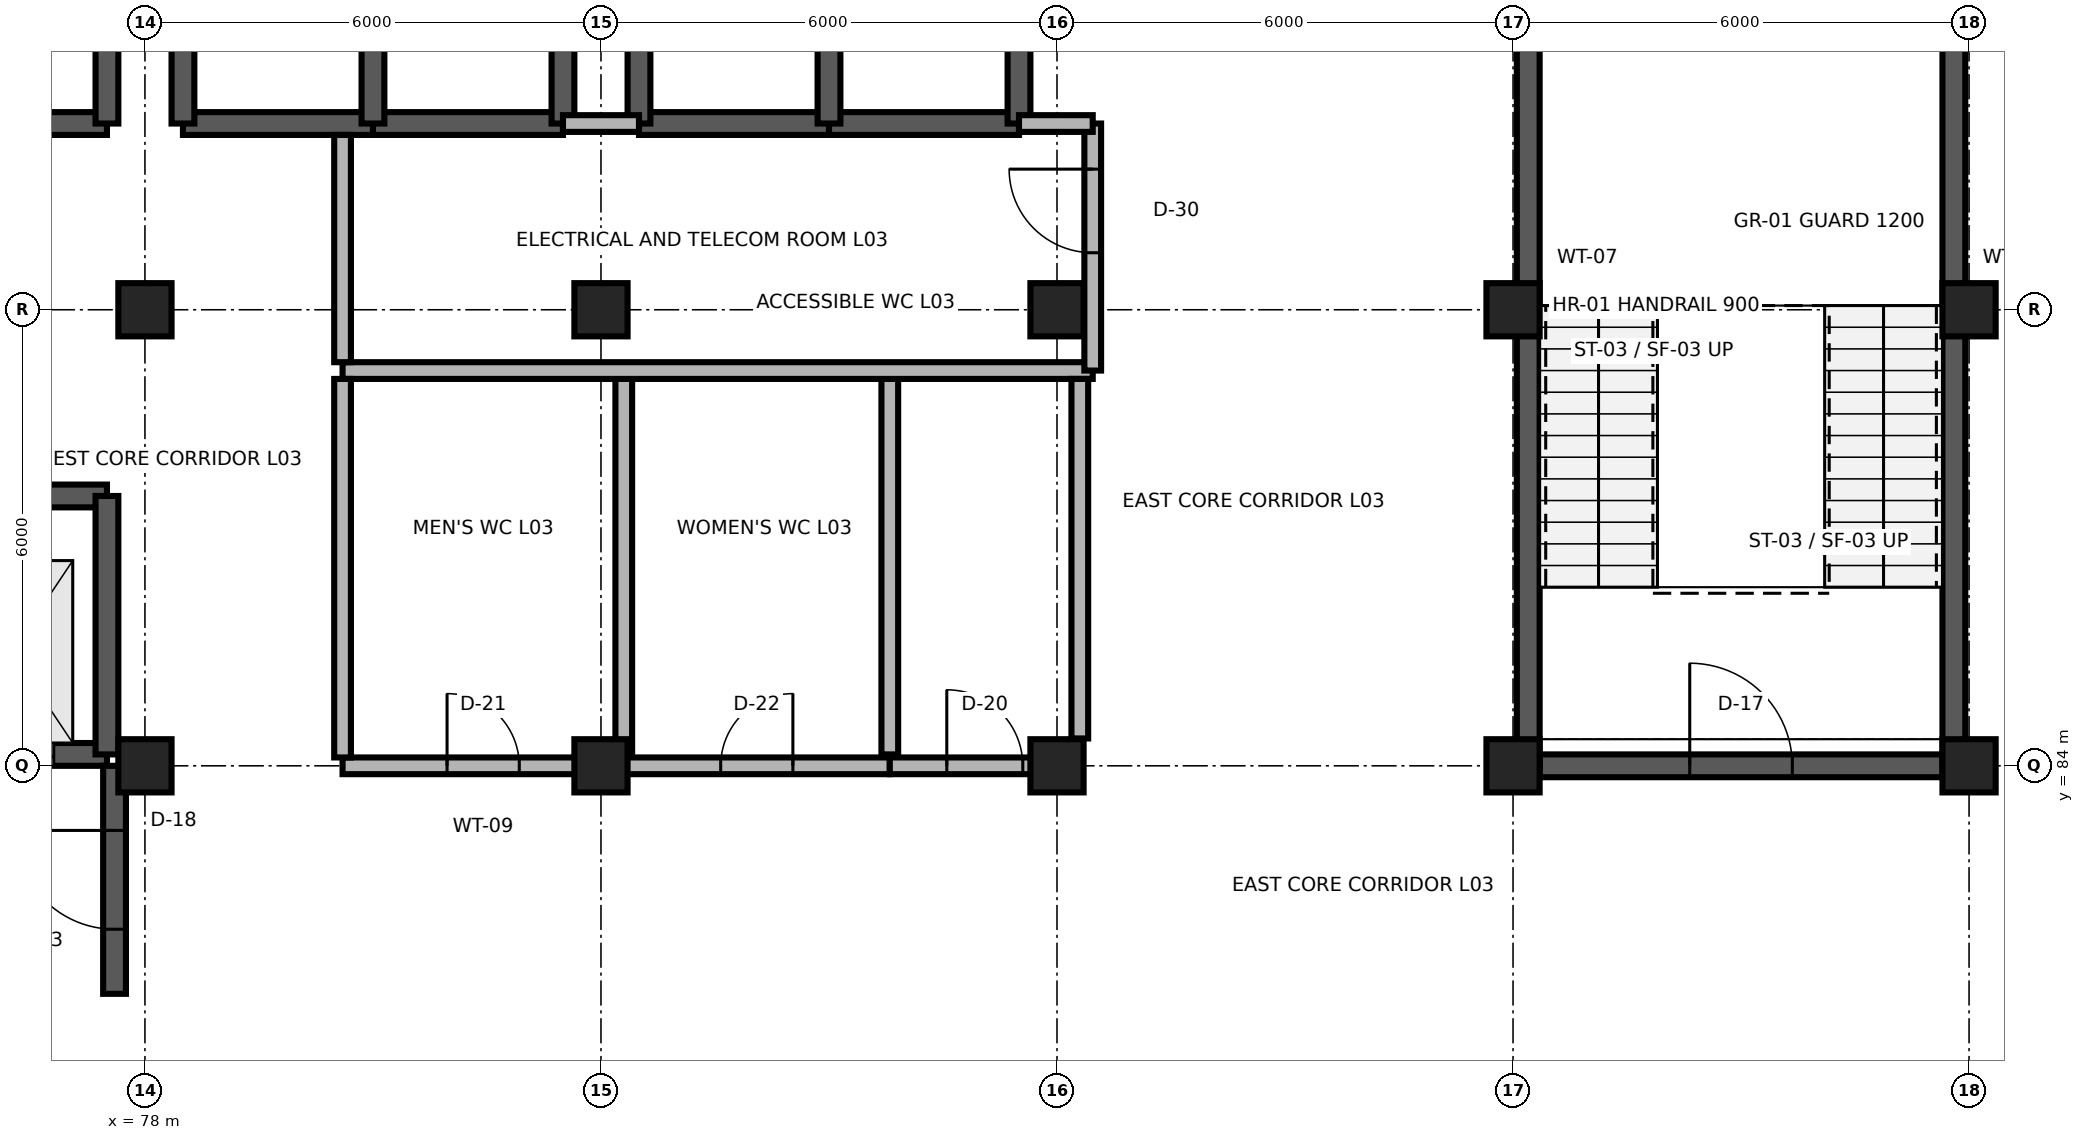
"""IFC4 building model, lengths in metres.
Left out: names, types, materials, properties, quantities, classifications, styles, units other than length and angle.
Written with IfcOpenShell. Run it as: python <this file> out.ifc"""

import sys

from ifc_helpers import new_model, si_unit, direction, frame, frame_2d, origin, origin_2d, place, context, subcontext, project, spatial, rectangle, extrude, element, fill, save


model = new_model("IFC4")
c1 = context("Model", 3, precision=1e-05, world=origin(), true_north=direction((0.0, 1.0)))
c2 = subcontext(c1, "Body", "Model", "MODEL_VIEW")
j1 = project(units=[si_unit("LENGTHUNIT", "METRE"), si_unit("PLANEANGLEUNIT", "RADIAN")], contexts=[c1])
p1 = place(None, origin())
s1 = spatial("IfcSite", under=j1, at=p1, CompositionType="ELEMENT")
p2 = place(p1, origin())
s2 = spatial("IfcBuilding", under=s1, at=p2, CompositionType="ELEMENT")
p3 = place(p2, frame((0.0, 0.0, 12.0)))
s3 = spatial("IfcBuildingStorey", under=s2, at=p3, CompositionType="ELEMENT", Elevation=12.0)
for number, where, z_axis, x_axis in (
    (1, (78.0, 84.0, 0.0), (0.0, 0.0, 1.0), (1.0, 0.0, 0.0)),
    (2, (84.0, 84.0, 0.0), (0.0, 0.0, 1.0), (1.0, 0.0, 0.0)),
    (3, (90.0, 84.0, 0.0), (0.0, 0.0, 1.0), (1.0, 0.0, 0.0)),
    (4, (96.0, 84.0, 0.0), (0.0, 0.0, 1.0), (1.0, 0.0, 0.0)),
    (5, (102.0, 84.0, 0.0), (0.0, 0.0, 1.0), (1.0, 0.0, 0.0)),
    (6, (78.0, 90.0, 0.0), (0.0, 0.0, 1.0), (1.0, 0.0, 0.0)),
    (7, (84.0, 90.0, 0.0), (0.0, 0.0, 1.0), (1.0, 0.0, 0.0)),
    (8, (90.0, 90.0, 0.0), (0.0, 0.0, 1.0), (1.0, 0.0, 0.0)),
    (9, (96.0, 90.0, 0.0), (0.0, 0.0, 1.0), (1.0, 0.0, 0.0)),
    (10, (102.0, 90.0, 0.0), (0.0, 0.0, 1.0), (1.0, 0.0, 0.0)),
):
    element("IfcColumn", number, at=place(p3, frame(where, z_axis=z_axis, x_axis=x_axis)), inside=s3, PredefinedType="COLUMN", context=c2, shape_type="SweptSolid", body=[
        extrude(rectangle(XDim=0.7, YDim=0.7, at=origin_2d()), origin(), (0.0, 0.0, 1.0), 4.5),
    ])
p4 = place(p3, frame((96.35, 84.0, 0.0), z_axis=(0.0, 0.0, 1.0), x_axis=(1.0, 0.0, 0.0)))
e11 = element("IfcWall", 11, at=p4, inside=s3, PredefinedType="SHEAR", context=c2, shape_type="SweptSolid", body=[
    extrude(rectangle(XDim=5.3, YDim=0.3, at=frame_2d((2.65, 0.0))), origin(), (0.0, 0.0, 1.0), 4.22),
])
p5 = place(p4, frame((1.975, 0.0, 0.0)))
e12 = element("IfcOpeningElement", 12, at=p5, cuts=e11, PredefinedType="OPENING", context=c2, shape_type="SweptSolid", body=[
    extrude(rectangle(XDim=1.35, YDim=2.2, at=frame_2d((0.675, 1.1))), frame((0.0, 0.165, 0.0), z_axis=(0.0, -1.0, 0.0), x_axis=(1.0, 0.0, 0.0)), (0.0, 0.0, 1.0), 0.33),
])
for number, where, z_axis, x_axis in (
    (13, (96.2, 84.0, 0.0), (0.0, 0.0, 1.0), (0.0, 1.0, 0.0)),
    (14, (101.8, 84.0, 0.0), (0.0, 0.0, 1.0), (0.0, 1.0, 0.0)),
):
    element("IfcWall", number, at=place(p3, frame(where, z_axis=z_axis, x_axis=x_axis)), inside=s3, PredefinedType="SHEAR", context=c2, shape_type="SweptSolid", body=[
        extrude(rectangle(XDim=11.8, YDim=0.3, at=frame_2d((5.9, 0.0))), origin(), (0.0, 0.0, 1.0), 4.22),
    ])
p6 = place(p3, frame((75.0, 84.15, 0.0), z_axis=(0.0, 0.0, 1.0), x_axis=(1.0, 0.0, 0.0)))
e15 = element("IfcWall", 15, at=p6, inside=s3, PredefinedType="SHEAR", context=c2, shape_type="SweptSolid", body=[
    extrude(rectangle(XDim=2.5, YDim=0.3, at=frame_2d((1.25, 0.0))), origin(), (0.0, 0.0, 1.0), 4.22),
])
p7 = place(p6, frame((0.7, 0.0, 0.0)))
e16 = element("IfcOpeningElement", 16, at=p7, cuts=e15, PredefinedType="OPENING", context=c2, shape_type="SweptSolid", body=[
    extrude(rectangle(XDim=1.1, YDim=2.1, at=frame_2d((0.55, 1.05))), frame((0.0, 0.165, 0.0), z_axis=(0.0, -1.0, 0.0), x_axis=(1.0, 0.0, 0.0)), (0.0, 0.0, 1.0), 0.33),
])
p8 = place(p3, frame((75.0, 87.55, 0.0), z_axis=(0.0, 0.0, 1.0), x_axis=(1.0, 0.0, 0.0)))
e17 = element("IfcWall", 17, at=p8, inside=s3, PredefinedType="SHEAR", context=c2, shape_type="SweptSolid", body=[
    extrude(rectangle(XDim=2.5, YDim=0.3, at=frame_2d((1.25, 0.0))), origin(), (0.0, 0.0, 1.0), 4.22),
])
p9 = place(p3, frame((77.5, 84.15, 0.0), z_axis=(0.0, 0.0, 1.0), x_axis=(0.0, 1.0, 0.0)))
e18 = element("IfcWall", 18, at=p9, inside=s3, PredefinedType="SHEAR", context=c2, shape_type="SweptSolid", body=[
    extrude(rectangle(XDim=3.4, YDim=0.3, at=frame_2d((1.7, 0.0))), origin(), (0.0, 0.0, 1.0), 4.22),
])
p10 = place(p3, frame((75.0, 92.45, 0.0), z_axis=(0.0, 0.0, 1.0), x_axis=(1.0, 0.0, 0.0)))
e19 = element("IfcWall", 19, at=p10, inside=s3, PredefinedType="SHEAR", context=c2, shape_type="SweptSolid", body=[
    extrude(rectangle(XDim=2.5, YDim=0.3, at=frame_2d((1.25, 0.0))), origin(), (0.0, 0.0, 1.0), 4.22),
])
p11 = place(p3, frame((77.5, 92.45, 0.0), z_axis=(0.0, 0.0, 1.0), x_axis=(0.0, 1.0, 0.0)))
e20 = element("IfcWall", 20, at=p11, inside=s3, PredefinedType="SHEAR", context=c2, shape_type="SweptSolid", body=[
    extrude(rectangle(XDim=3.4, YDim=0.3, at=frame_2d((1.7, 0.0))), origin(), (0.0, 0.0, 1.0), 4.22),
])
p12 = place(p3, frame((78.5, 92.45, 0.0), z_axis=(0.0, 0.0, 1.0), x_axis=(1.0, 0.0, 0.0)))
e21 = element("IfcWall", 21, at=p12, inside=s3, PredefinedType="SHEAR", context=c2, shape_type="SweptSolid", body=[
    extrude(rectangle(XDim=2.5, YDim=0.3, at=frame_2d((1.25, 0.0))), origin(), (0.0, 0.0, 1.0), 4.22),
])
p13 = place(p3, frame((78.5, 92.45, 0.0), z_axis=(0.0, 0.0, 1.0), x_axis=(0.0, 1.0, 0.0)))
e22 = element("IfcWall", 22, at=p13, inside=s3, PredefinedType="SHEAR", context=c2, shape_type="SweptSolid", body=[
    extrude(rectangle(XDim=3.4, YDim=0.3, at=frame_2d((1.7, 0.0))), origin(), (0.0, 0.0, 1.0), 4.22),
])
p14 = place(p3, frame((81.0, 92.45, 0.0), z_axis=(0.0, 0.0, 1.0), x_axis=(1.0, 0.0, 0.0)))
e23 = element("IfcWall", 23, at=p14, inside=s3, PredefinedType="SHEAR", context=c2, shape_type="SweptSolid", body=[
    extrude(rectangle(XDim=2.5, YDim=0.3, at=frame_2d((1.25, 0.0))), origin(), (0.0, 0.0, 1.0), 4.22),
])
for number, where, z_axis, x_axis in (
    (24, (81.0, 92.45, 0.0), (0.0, 0.0, 1.0), (0.0, 1.0, 0.0)),
    (25, (83.5, 92.45, 0.0), (0.0, 0.0, 1.0), (0.0, 1.0, 0.0)),
):
    element("IfcWall", number, at=place(p3, frame(where, z_axis=z_axis, x_axis=x_axis)), inside=s3, PredefinedType="SHEAR", context=c2, shape_type="SweptSolid", body=[
        extrude(rectangle(XDim=3.4, YDim=0.3, at=frame_2d((1.7, 0.0))), origin(), (0.0, 0.0, 1.0), 4.22),
    ])
p15 = place(p3, frame((84.5, 92.45, 0.0), z_axis=(0.0, 0.0, 1.0), x_axis=(1.0, 0.0, 0.0)))
e26 = element("IfcWall", 26, at=p15, inside=s3, PredefinedType="SHEAR", context=c2, shape_type="SweptSolid", body=[
    extrude(rectangle(XDim=2.5, YDim=0.3, at=frame_2d((1.25, 0.0))), origin(), (0.0, 0.0, 1.0), 4.22),
])
p16 = place(p3, frame((84.5, 92.45, 0.0), z_axis=(0.0, 0.0, 1.0), x_axis=(0.0, 1.0, 0.0)))
e27 = element("IfcWall", 27, at=p16, inside=s3, PredefinedType="SHEAR", context=c2, shape_type="SweptSolid", body=[
    extrude(rectangle(XDim=3.4, YDim=0.3, at=frame_2d((1.7, 0.0))), origin(), (0.0, 0.0, 1.0), 4.22),
])
p17 = place(p3, frame((87.0, 92.45, 0.0), z_axis=(0.0, 0.0, 1.0), x_axis=(1.0, 0.0, 0.0)))
e28 = element("IfcWall", 28, at=p17, inside=s3, PredefinedType="SHEAR", context=c2, shape_type="SweptSolid", body=[
    extrude(rectangle(XDim=2.5, YDim=0.3, at=frame_2d((1.25, 0.0))), origin(), (0.0, 0.0, 1.0), 4.22),
])
for number, where, z_axis, x_axis in (
    (29, (87.0, 92.45, 0.0), (0.0, 0.0, 1.0), (0.0, 1.0, 0.0)),
    (30, (89.5, 92.45, 0.0), (0.0, 0.0, 1.0), (0.0, 1.0, 0.0)),
):
    element("IfcWall", number, at=place(p3, frame(where, z_axis=z_axis, x_axis=x_axis)), inside=s3, PredefinedType="SHEAR", context=c2, shape_type="SweptSolid", body=[
        extrude(rectangle(XDim=3.4, YDim=0.3, at=frame_2d((1.7, 0.0))), origin(), (0.0, 0.0, 1.0), 4.22),
    ])
p18 = place(p3, frame((77.6, 81.0, 0.0), z_axis=(0.0, 0.0, 1.0), x_axis=(0.0, 1.0, 0.0)))
e31 = element("IfcWall", 31, at=p18, inside=s3, PredefinedType="SHEAR", context=c2, shape_type="SweptSolid", body=[
    extrude(rectangle(XDim=3.0, YDim=0.3, at=frame_2d((1.5, 0.0))), origin(), (0.0, 0.0, 1.0), 4.22),
])
p19 = place(p18, frame((0.85, 0.0, 0.0)))
e32 = element("IfcOpeningElement", 32, at=p19, cuts=e31, PredefinedType="OPENING", context=c2, shape_type="SweptSolid", body=[
    extrude(rectangle(XDim=1.3, YDim=2.2, at=frame_2d((0.65, 1.1))), frame((0.0, 0.165, 0.0), z_axis=(0.0, -1.0, 0.0), x_axis=(1.0, 0.0, 0.0)), (0.0, 0.0, 1.0), 0.33),
])
p20 = place(p3, frame((80.6, 84.0, 0.0), z_axis=(0.0, 0.0, 1.0), x_axis=(1.0, 0.0, 0.0)))
e33 = element("IfcWall", 33, at=p20, inside=s3, PredefinedType="PARTITIONING", context=c2, shape_type="SweptSolid", body=[
    extrude(rectangle(XDim=3.7, YDim=0.22, at=frame_2d((1.85, 0.0))), origin(), (0.0, 0.0, 1.0), 3.738),
])
p21 = place(p20, frame((1.375, 0.0, 0.0)))
e34 = element("IfcOpeningElement", 34, at=p21, cuts=e33, PredefinedType="OPENING", context=c2, shape_type="SweptSolid", body=[
    extrude(rectangle(XDim=0.95, YDim=2.15, at=frame_2d((0.475, 1.075))), frame((0.0, 0.125, 0.0), z_axis=(0.0, -1.0, 0.0), x_axis=(1.0, 0.0, 0.0)), (0.0, 0.0, 1.0), 0.25),
])
p22 = place(p3, frame((84.3, 84.0, 0.0), z_axis=(0.0, 0.0, 1.0), x_axis=(1.0, 0.0, 0.0)))
e35 = element("IfcWall", 35, at=p22, inside=s3, PredefinedType="PARTITIONING", context=c2, shape_type="SweptSolid", body=[
    extrude(rectangle(XDim=3.5, YDim=0.22, at=frame_2d((1.75, 0.0))), origin(), (0.0, 0.0, 1.0), 3.738),
])
p23 = place(p22, frame((1.275, 0.0, 0.0)))
e36 = element("IfcOpeningElement", 36, at=p23, cuts=e35, PredefinedType="OPENING", context=c2, shape_type="SweptSolid", body=[
    extrude(rectangle(XDim=0.95, YDim=2.1, at=frame_2d((0.475, 1.05))), frame((0.0, 0.125, 0.0), z_axis=(0.0, -1.0, 0.0), x_axis=(1.0, 0.0, 0.0)), (0.0, 0.0, 1.0), 0.25),
])
p24 = place(p3, frame((87.8, 84.0, 0.0), z_axis=(0.0, 0.0, 1.0), x_axis=(1.0, 0.0, 0.0)))
e37 = element("IfcWall", 37, at=p24, inside=s3, PredefinedType="PARTITIONING", context=c2, shape_type="SweptSolid", body=[
    extrude(rectangle(XDim=2.5, YDim=0.22, at=frame_2d((1.25, 0.0))), origin(), (0.0, 0.0, 1.0), 3.738),
])
p25 = place(p24, frame((0.75, 0.0, 0.0)))
e38 = element("IfcOpeningElement", 38, at=p25, cuts=e37, PredefinedType="OPENING", context=c2, shape_type="SweptSolid", body=[
    extrude(rectangle(XDim=1.0, YDim=2.15, at=frame_2d((0.5, 1.075))), frame((0.0, 0.125, 0.0), z_axis=(0.0, -1.0, 0.0), x_axis=(1.0, 0.0, 0.0)), (0.0, 0.0, 1.0), 0.25),
])
for number, where, z_axis, x_axis in (
    (39, (84.3, 84.15, 0.0), (0.0, 0.0, 1.0), (0.0, 1.0, 0.0)),
    (40, (87.8, 84.15, 0.0), (0.0, 0.0, 1.0), (0.0, 1.0, 0.0)),
):
    element("IfcWall", number, at=place(p3, frame(where, z_axis=z_axis, x_axis=x_axis)), inside=s3, PredefinedType="PARTITIONING", context=c2, shape_type="SweptSolid", body=[
        extrude(rectangle(XDim=5.0, YDim=0.22, at=frame_2d((2.5, 0.0))), origin(), (0.0, 0.0, 1.0), 4.22),
    ])
p26 = place(p3, frame((80.6, 89.2, 0.0), z_axis=(0.0, 0.0, 1.0), x_axis=(1.0, 0.0, 0.0)))
e41 = element("IfcWall", 41, at=p26, inside=s3, PredefinedType="PARTITIONING", context=c2, shape_type="SweptSolid", body=[
    extrude(rectangle(XDim=9.87, YDim=0.22, at=frame_2d((4.935, 0.0))), origin(), (0.0, 0.0, 1.0), 4.22),
])
p27 = place(p3, frame((90.47, 89.2, 0.0), z_axis=(0.0, 0.0, 1.0), x_axis=(0.0, 1.0, 0.0)))
e42 = element("IfcWall", 42, at=p27, inside=s3, PredefinedType="PARTITIONING", context=c2, shape_type="SweptSolid", body=[
    extrude(rectangle(XDim=3.25, YDim=0.22, at=frame_2d((1.625, 0.0))), origin(), (0.0, 0.0, 1.0), 4.22),
])
p28 = place(p27, frame((1.55, 0.0, 0.0)))
e43 = element("IfcOpeningElement", 43, at=p28, cuts=e42, PredefinedType="OPENING", context=c2, shape_type="SweptSolid", body=[
    extrude(rectangle(XDim=1.1, YDim=2.15, at=frame_2d((0.55, 1.075))), frame((0.0, 0.125, 0.0), z_axis=(0.0, -1.0, 0.0), x_axis=(1.0, 0.0, 0.0)), (0.0, 0.0, 1.0), 0.25),
])
p29 = place(p3, frame((80.6, 84.11, 0.0), z_axis=(0.0, 0.0, 1.0), x_axis=(0.0, 1.0, 0.0)))
e44 = element("IfcWall", 44, at=p29, inside=s3, PredefinedType="PARTITIONING", context=c2, shape_type="SweptSolid", body=[
    extrude(rectangle(XDim=4.98, YDim=0.22, at=frame_2d((2.49, 0.0))), origin(), (0.0, 0.0, 1.0), 4.22),
])
p30 = place(p3, frame((90.3, 84.36, 0.0), z_axis=(0.0, 0.0, 1.0), x_axis=(0.0, 1.0, 0.0)))
e45 = element("IfcWall", 45, at=p30, inside=s3, PredefinedType="PARTITIONING", context=c2, shape_type="SweptSolid", body=[
    extrude(rectangle(XDim=4.73, YDim=0.22, at=frame_2d((2.365, 0.0))), origin(), (0.0, 0.0, 1.0), 4.22),
])
p31 = place(p3, frame((80.6, 89.31, 0.0), z_axis=(0.0, 0.0, 1.0), x_axis=(0.0, 1.0, 0.0)))
e46 = element("IfcWall", 46, at=p31, inside=s3, PredefinedType="PARTITIONING", context=c2, shape_type="SweptSolid", body=[
    extrude(rectangle(XDim=2.99, YDim=0.22, at=frame_2d((1.495, 0.0))), origin(), (0.0, 0.0, 1.0), 4.22),
])
p32 = place(p3, frame((83.5, 92.45, 0.0), z_axis=(0.0, 0.0, 1.0), x_axis=(1.0, 0.0, 0.0)))
e47 = element("IfcWall", 47, at=p32, inside=s3, PredefinedType="PARTITIONING", context=c2, shape_type="SweptSolid", body=[
    extrude(rectangle(XDim=1.0, YDim=0.22, at=frame_2d((0.5, 0.0))), origin(), (0.0, 0.0, 1.0), 4.22),
])
p33 = place(p3, frame((89.5, 92.45, 0.0), z_axis=(0.0, 0.0, 1.0), x_axis=(1.0, 0.0, 0.0)))
e48 = element("IfcWall", 48, at=p33, inside=s3, PredefinedType="PARTITIONING", context=c2, shape_type="SweptSolid", body=[
    extrude(rectangle(XDim=0.97, YDim=0.22, at=frame_2d((0.485, 0.0))), origin(), (0.0, 0.0, 1.0), 4.22),
])
p34 = place(p5, origin())
e49 = element("IfcDoor", 49, at=p34, inside=s3, OperationType="SINGLE_SWING_LEFT", PredefinedType="DOOR", context=c2, shape_type="SweptSolid", body=[
    extrude(rectangle(XDim=1.35, YDim=2.2, at=frame_2d((0.675, 1.1))), frame((0.0, 0.025, 0.0), z_axis=(0.0, -1.0, 0.0), x_axis=(1.0, 0.0, 0.0)), (0.0, 0.0, 1.0), 0.05),
])
fill(e12, e49)
p35 = place(p7, origin())
e50 = element("IfcDoor", 50, at=p35, inside=s3, OperationType="DOUBLE_DOOR_SLIDING", PredefinedType="DOOR", context=c2, shape_type="SweptSolid", body=[
    extrude(rectangle(XDim=1.1, YDim=2.1, at=frame_2d((0.55, 1.05))), frame((0.0, 0.025, 0.0), z_axis=(0.0, -1.0, 0.0), x_axis=(1.0, 0.0, 0.0)), (0.0, 0.0, 1.0), 0.05),
])
fill(e16, e50)
p36 = place(p19, origin())
e51 = element("IfcDoor", 51, at=p36, inside=s3, OperationType="SINGLE_SWING_RIGHT", PredefinedType="DOOR", context=c2, shape_type="SweptSolid", body=[
    extrude(rectangle(XDim=1.3, YDim=2.2, at=frame_2d((0.65, 1.1))), frame((0.0, 0.025, 0.0), z_axis=(0.0, -1.0, 0.0), x_axis=(1.0, 0.0, 0.0)), (0.0, 0.0, 1.0), 0.05),
])
fill(e32, e51)
p37 = place(p21, origin())
e52 = element("IfcDoor", 52, at=p37, inside=s3, OperationType="SINGLE_SWING_LEFT", PredefinedType="DOOR", context=c2, shape_type="SweptSolid", body=[
    extrude(rectangle(XDim=0.95, YDim=2.15, at=frame_2d((0.475, 1.075))), frame((0.0, 0.025, 0.0), z_axis=(0.0, -1.0, 0.0), x_axis=(1.0, 0.0, 0.0)), (0.0, 0.0, 1.0), 0.05),
])
fill(e34, e52)
p38 = place(p23, origin())
e53 = element("IfcDoor", 53, at=p38, inside=s3, OperationType="SINGLE_SWING_RIGHT", PredefinedType="DOOR", context=c2, shape_type="SweptSolid", body=[
    extrude(rectangle(XDim=0.95, YDim=2.1, at=frame_2d((0.475, 1.05))), frame((0.0, 0.025, 0.0), z_axis=(0.0, -1.0, 0.0), x_axis=(1.0, 0.0, 0.0)), (0.0, 0.0, 1.0), 0.05),
])
fill(e36, e53)
p39 = place(p25, origin())
e54 = element("IfcDoor", 54, at=p39, inside=s3, OperationType="SINGLE_SWING_LEFT", PredefinedType="DOOR", context=c2, shape_type="SweptSolid", body=[
    extrude(rectangle(XDim=1.0, YDim=2.15, at=frame_2d((0.5, 1.075))), frame((0.0, 0.025, 0.0), z_axis=(0.0, -1.0, 0.0), x_axis=(1.0, 0.0, 0.0)), (0.0, 0.0, 1.0), 0.05),
])
fill(e38, e54)
p40 = place(p28, origin())
e55 = element("IfcDoor", 55, at=p40, inside=s3, OperationType="SINGLE_SWING_RIGHT", PredefinedType="DOOR", context=c2, shape_type="SweptSolid", body=[
    extrude(rectangle(XDim=1.1, YDim=2.15, at=frame_2d((0.55, 1.075))), frame((0.0, 0.025, 0.0), z_axis=(0.0, -1.0, 0.0), x_axis=(1.0, 0.0, 0.0)), (0.0, 0.0, 1.0), 0.05),
])
fill(e43, e55)
save(model, sys.argv[1])
